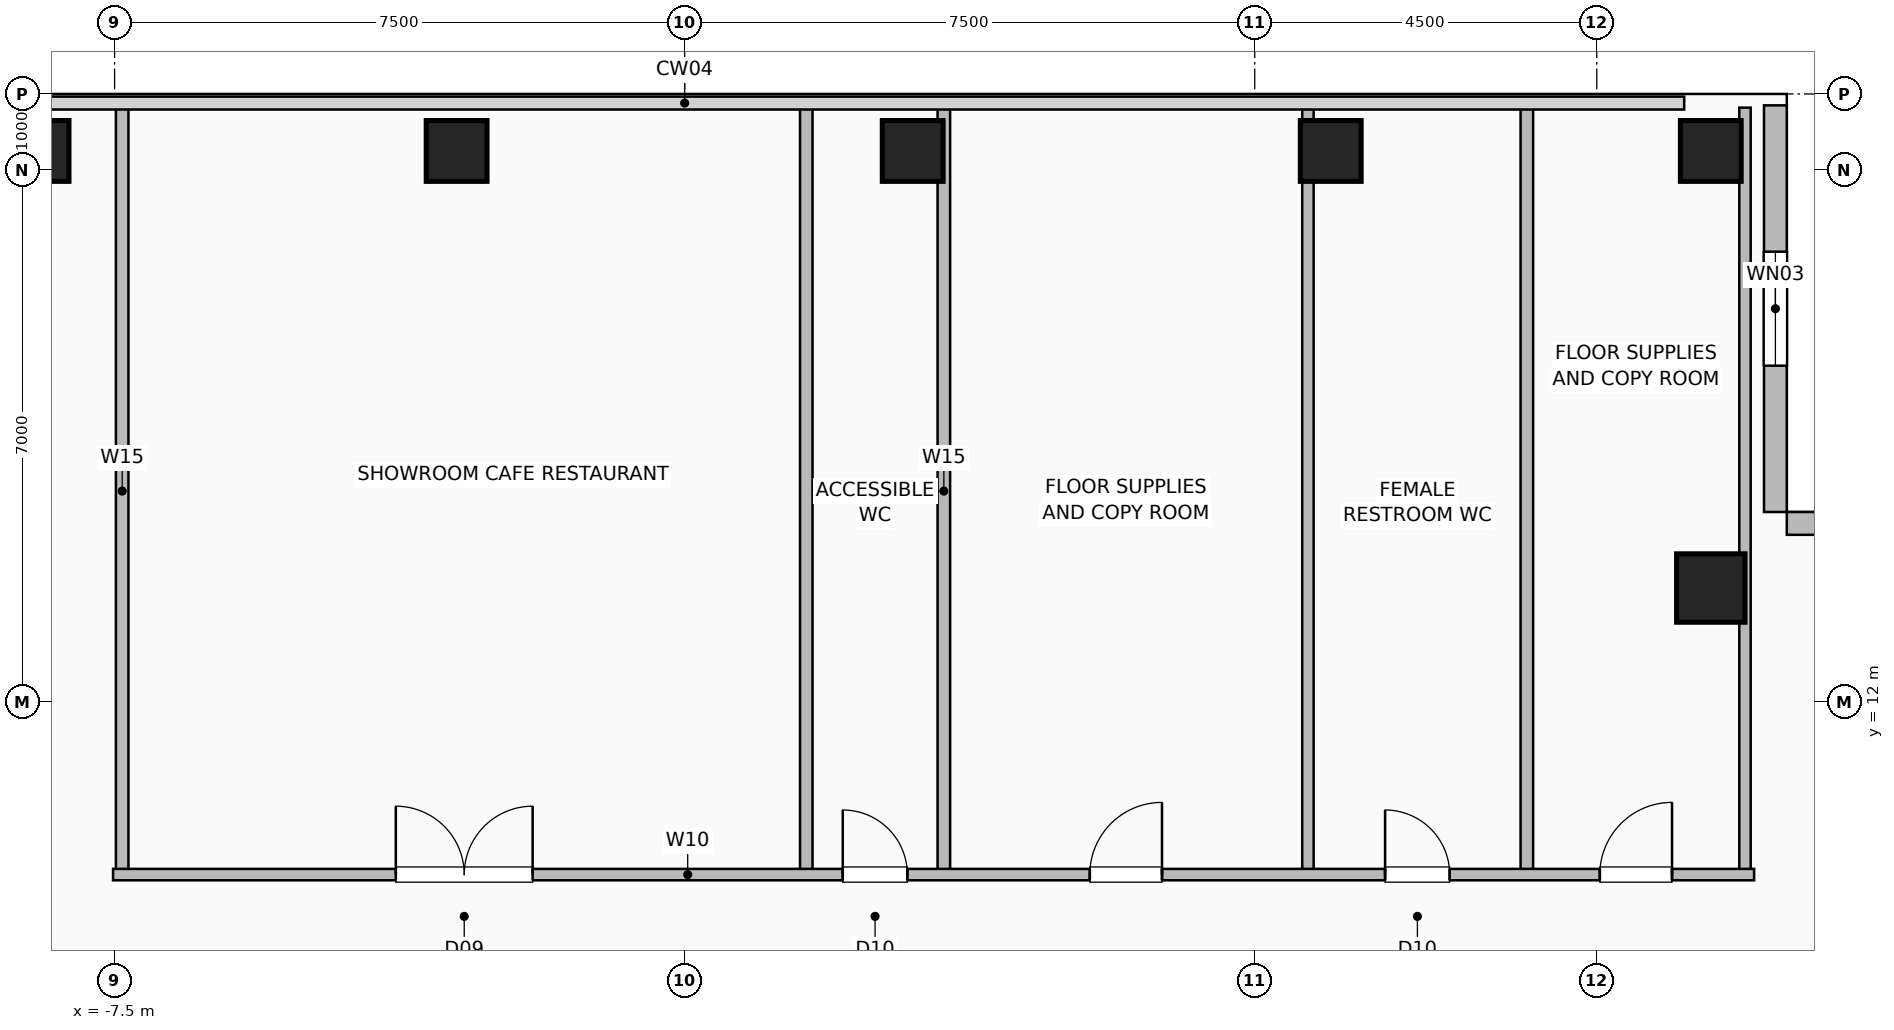
"""IFC4 building model, lengths in metres.
Left out: names, types, materials, properties, quantities, classifications, styles, units other than length and angle.
Written with IfcOpenShell. Run it as: python <this file> out.ifc"""

import sys

from ifc_helpers import new_model, si_unit, direction, frame, frame_2d, origin, origin_2d, place, context, subcontext, project, spatial, rectangle, hollow_rectangle, extrude, element, fill, save


model = new_model("IFC4")
c1 = context("Model", 3, precision=1e-05, world=origin(), true_north=direction((0.0, 1.0)))
c2 = subcontext(c1, "Body", "Model", "MODEL_VIEW")
j1 = project(units=[si_unit("LENGTHUNIT", "METRE"), si_unit("PLANEANGLEUNIT", "RADIAN")], contexts=[c1])
p1 = place(None, origin())
s1 = spatial("IfcSite", under=j1, at=p1, CompositionType="ELEMENT")
p2 = place(p1, origin())
s2 = spatial("IfcBuilding", under=s1, at=p2, CompositionType="ELEMENT")
p3 = place(p2, frame((0.0, 0.0, 220.2)))
s3 = spatial("IfcBuildingStorey", under=s2, at=p3, CompositionType="ELEMENT", Elevation=220.2)
for number, where, z_axis, x_axis in (
    (1, (-8.5, 19.25, 0.0), (0.0, 0.0, 1.0), (1.0, 0.0, 0.0)),
    (2, (-3.0, 19.25, 0.0), (0.0, 0.0, 1.0), (1.0, 0.0, 0.0)),
    (3, (3.0, 19.25, 0.0), (0.0, 0.0, 1.0), (1.0, 0.0, 0.0)),
    (4, (8.5, 19.25, 0.0), (0.0, 0.0, 1.0), (1.0, 0.0, 0.0)),
    (5, (13.5, 19.25, 0.0), (0.0, 0.0, 1.0), (1.0, 0.0, 0.0)),
):
    element("IfcColumn", number, at=place(p3, frame(where, z_axis=z_axis, x_axis=x_axis)), inside=s3, PredefinedType="COLUMN", context=c2, shape_type="SweptSolid", body=[
        extrude(hollow_rectangle(XDim=0.8, YDim=0.8, WallThickness=0.04, at=origin_2d()), origin(), (0.0, 0.0, 1.0), 3.6),
    ])
p4 = place(p3, frame((13.5, 13.5, 0.0), z_axis=(0.0, 0.0, 1.0), x_axis=(1.0, 0.0, 0.0)))
e6 = element("IfcColumn", 6, at=p4, inside=s3, PredefinedType="COLUMN", context=c2, shape_type="SweptSolid", body=[
    extrude(hollow_rectangle(XDim=0.9, YDim=0.9, WallThickness=0.045, at=origin_2d()), origin(), (0.0, 0.0, 1.0), 3.6),
])
p5 = place(p3, frame((14.35, 19.85, 0.0), z_axis=(0.0, 0.0, 1.0), x_axis=(0.0, -1.0, 0.0)))
e7 = element("IfcWall", 7, at=p5, inside=s3, PredefinedType="SOLIDWALL", context=c2, shape_type="SweptSolid", body=[
    extrude(rectangle(XDim=5.35, YDim=0.3, at=frame_2d((2.675, 0.0))), origin(), (0.0, 0.0, 1.0), 3.36),
])
p6 = place(p5, frame((1.925, 0.0, 0.9)))
e8 = element("IfcOpeningElement", 8, at=p6, cuts=e7, PredefinedType="OPENING", context=c2, shape_type="SweptSolid", body=[
    extrude(rectangle(XDim=1.5, YDim=1.8, at=frame_2d((0.75, 0.9))), frame((0.0, 0.16, 0.0), z_axis=(0.0, -1.0, 0.0), x_axis=(1.0, 0.0, 0.0)), (0.0, 0.0, 1.0), 0.32),
])
p7 = place(p3, frame((19.85, 14.35, 0.0), z_axis=(0.0, 0.0, 1.0), x_axis=(-1.0, 0.0, 0.0)))
e9 = element("IfcWall", 9, at=p7, inside=s3, PredefinedType="SOLIDWALL", context=c2, shape_type="SweptSolid", body=[
    extrude(rectangle(XDim=5.35, YDim=0.3, at=frame_2d((2.675, 0.0))), origin(), (0.0, 0.0, 1.0), 3.36),
])
for number, where, z_axis, x_axis in (
    (10, (3.41, 9.73, 0.0), (0.0, 0.0, 1.0), (0.0, 1.0, 0.0)),
    (11, (11.08, 9.73, 0.0), (0.0, 0.0, 1.0), (0.0, 1.0, 0.0)),
    (12, (-7.4, 9.73, 0.0), (0.0, 0.0, 1.0), (0.0, 1.0, 0.0)),
    (13, (1.6, 9.73, 0.0), (0.0, 0.0, 1.0), (0.0, 1.0, 0.0)),
):
    element("IfcWall", number, at=place(p3, frame(where, z_axis=z_axis, x_axis=x_axis)), inside=s3, PredefinedType="PLUMBINGWALL", context=c2, shape_type="SweptSolid", body=[
        extrude(rectangle(XDim=10.09, YDim=0.165, at=frame_2d((5.045, 0.0))), origin(), (0.0, 0.0, 1.0), 3.36),
    ])
for number, where, z_axis, x_axis in (
    (14, (8.2, 9.73, 0.0), (0.0, 0.0, 1.0), (0.0, 1.0, 0.0)),
    (15, (13.95, 9.73, 0.0), (0.0, 0.0, 1.0), (0.0, 1.0, 0.0)),
):
    element("IfcWall", number, at=place(p3, frame(where, z_axis=z_axis, x_axis=x_axis)), inside=s3, PredefinedType="PARTITIONING", context=c2, shape_type="SweptSolid", body=[
        extrude(rectangle(XDim=10.09, YDim=0.15, at=frame_2d((5.045, 0.0))), origin(), (0.0, 0.0, 1.0), 3.36),
    ])
p8 = place(p3, frame((-7.52, 9.73, 0.0), z_axis=(0.0, 0.0, 1.0), x_axis=(1.0, 0.0, 0.0)))
e16 = element("IfcWall", 16, at=p8, inside=s3, PredefinedType="PARTITIONING", context=c2, shape_type="SweptSolid", body=[
    extrude(rectangle(XDim=21.59, YDim=0.15, at=frame_2d((10.795, 0.0))), origin(), (0.0, 0.0, 1.0), 3.36),
])
p9 = place(p8, frame((3.72, 0.0, 0.0)))
e17 = element("IfcOpeningElement", 17, at=p9, cuts=e16, PredefinedType="OPENING", context=c2, shape_type="SweptSolid", body=[
    extrude(rectangle(XDim=1.8, YDim=2.08, at=frame_2d((0.9, 1.04))), frame((0.0, 0.085, 0.0), z_axis=(0.0, -1.0, 0.0), x_axis=(1.0, 0.0, 0.0)), (0.0, 0.0, 1.0), 0.17),
])
p10 = place(p8, frame((9.6, 0.0, 0.0)))
e18 = element("IfcOpeningElement", 18, at=p10, cuts=e16, PredefinedType="OPENING", context=c2, shape_type="SweptSolid", body=[
    extrude(rectangle(XDim=0.85, YDim=2.05, at=frame_2d((0.425, 1.025))), frame((0.0, 0.085, 0.0), z_axis=(0.0, -1.0, 0.0), x_axis=(1.0, 0.0, 0.0)), (0.0, 0.0, 1.0), 0.17),
])
p11 = place(p8, frame((12.85, 0.0, 0.0)))
e19 = element("IfcOpeningElement", 19, at=p11, cuts=e16, PredefinedType="OPENING", context=c2, shape_type="SweptSolid", body=[
    extrude(rectangle(XDim=0.95, YDim=2.06, at=frame_2d((0.475, 1.03))), frame((0.0, 0.085, 0.0), z_axis=(0.0, -1.0, 0.0), x_axis=(1.0, 0.0, 0.0)), (0.0, 0.0, 1.0), 0.17),
])
p12 = place(p8, frame((16.735, 0.0, 0.0)))
e20 = element("IfcOpeningElement", 20, at=p12, cuts=e16, PredefinedType="OPENING", context=c2, shape_type="SweptSolid", body=[
    extrude(rectangle(XDim=0.85, YDim=2.05, at=frame_2d((0.425, 1.025))), frame((0.0, 0.085, 0.0), z_axis=(0.0, -1.0, 0.0), x_axis=(1.0, 0.0, 0.0)), (0.0, 0.0, 1.0), 0.17),
])
p13 = place(p8, frame((19.56, 0.0, 0.0)))
e21 = element("IfcOpeningElement", 21, at=p13, cuts=e16, PredefinedType="OPENING", context=c2, shape_type="SweptSolid", body=[
    extrude(rectangle(XDim=0.95, YDim=2.06, at=frame_2d((0.475, 1.03))), frame((0.0, 0.085, 0.0), z_axis=(0.0, -1.0, 0.0), x_axis=(1.0, 0.0, 0.0)), (0.0, 0.0, 1.0), 0.17),
])
p14 = place(p6, origin())
e22 = element("IfcWindow", 22, at=p14, inside=s3, PartitioningType="SINGLE_PANEL", PredefinedType="WINDOW", context=c2, shape_type="SweptSolid", body=[
    extrude(rectangle(XDim=1.5, YDim=1.8, at=frame_2d((0.75, 0.9))), frame((0.0, 0.03, 0.0), z_axis=(0.0, -1.0, 0.0), x_axis=(1.0, 0.0, 0.0)), (0.0, 0.0, 1.0), 0.06),
])
fill(e8, e22)
p15 = place(p9, origin())
e23 = element("IfcDoor", 23, at=p15, inside=s3, OperationType="DOUBLE_DOOR_SINGLE_SWING", PredefinedType="DOOR", context=c2, shape_type="SweptSolid", body=[
    extrude(rectangle(XDim=1.8, YDim=2.08, at=frame_2d((0.9, 1.04))), frame((0.0, 0.025, 0.0), z_axis=(0.0, -1.0, 0.0), x_axis=(1.0, 0.0, 0.0)), (0.0, 0.0, 1.0), 0.05),
])
fill(e17, e23)
p16 = place(p10, origin())
e24 = element("IfcDoor", 24, at=p16, inside=s3, OperationType="SINGLE_SWING_LEFT", PredefinedType="DOOR", context=c2, shape_type="SweptSolid", body=[
    extrude(rectangle(XDim=0.85, YDim=2.05, at=frame_2d((0.425, 1.025))), frame((0.0, 0.025, 0.0), z_axis=(0.0, -1.0, 0.0), x_axis=(1.0, 0.0, 0.0)), (0.0, 0.0, 1.0), 0.05),
])
fill(e18, e24)
p17 = place(p11, origin())
e25 = element("IfcDoor", 25, at=p17, inside=s3, OperationType="SINGLE_SWING_RIGHT", PredefinedType="DOOR", context=c2, shape_type="SweptSolid", body=[
    extrude(rectangle(XDim=0.95, YDim=2.06, at=frame_2d((0.475, 1.03))), frame((0.0, 0.025, 0.0), z_axis=(0.0, -1.0, 0.0), x_axis=(1.0, 0.0, 0.0)), (0.0, 0.0, 1.0), 0.05),
])
fill(e19, e25)
p18 = place(p12, origin())
e26 = element("IfcDoor", 26, at=p18, inside=s3, OperationType="SINGLE_SWING_LEFT", PredefinedType="DOOR", context=c2, shape_type="SweptSolid", body=[
    extrude(rectangle(XDim=0.85, YDim=2.05, at=frame_2d((0.425, 1.025))), frame((0.0, 0.025, 0.0), z_axis=(0.0, -1.0, 0.0), x_axis=(1.0, 0.0, 0.0)), (0.0, 0.0, 1.0), 0.05),
])
fill(e20, e26)
p19 = place(p13, origin())
e27 = element("IfcDoor", 27, at=p19, inside=s3, OperationType="SINGLE_SWING_RIGHT", PredefinedType="DOOR", context=c2, shape_type="SweptSolid", body=[
    extrude(rectangle(XDim=0.95, YDim=2.06, at=frame_2d((0.475, 1.03))), frame((0.0, 0.025, 0.0), z_axis=(0.0, -1.0, 0.0), x_axis=(1.0, 0.0, 0.0)), (0.0, 0.0, 1.0), 0.05),
])
fill(e21, e27)
save(model, sys.argv[1])
